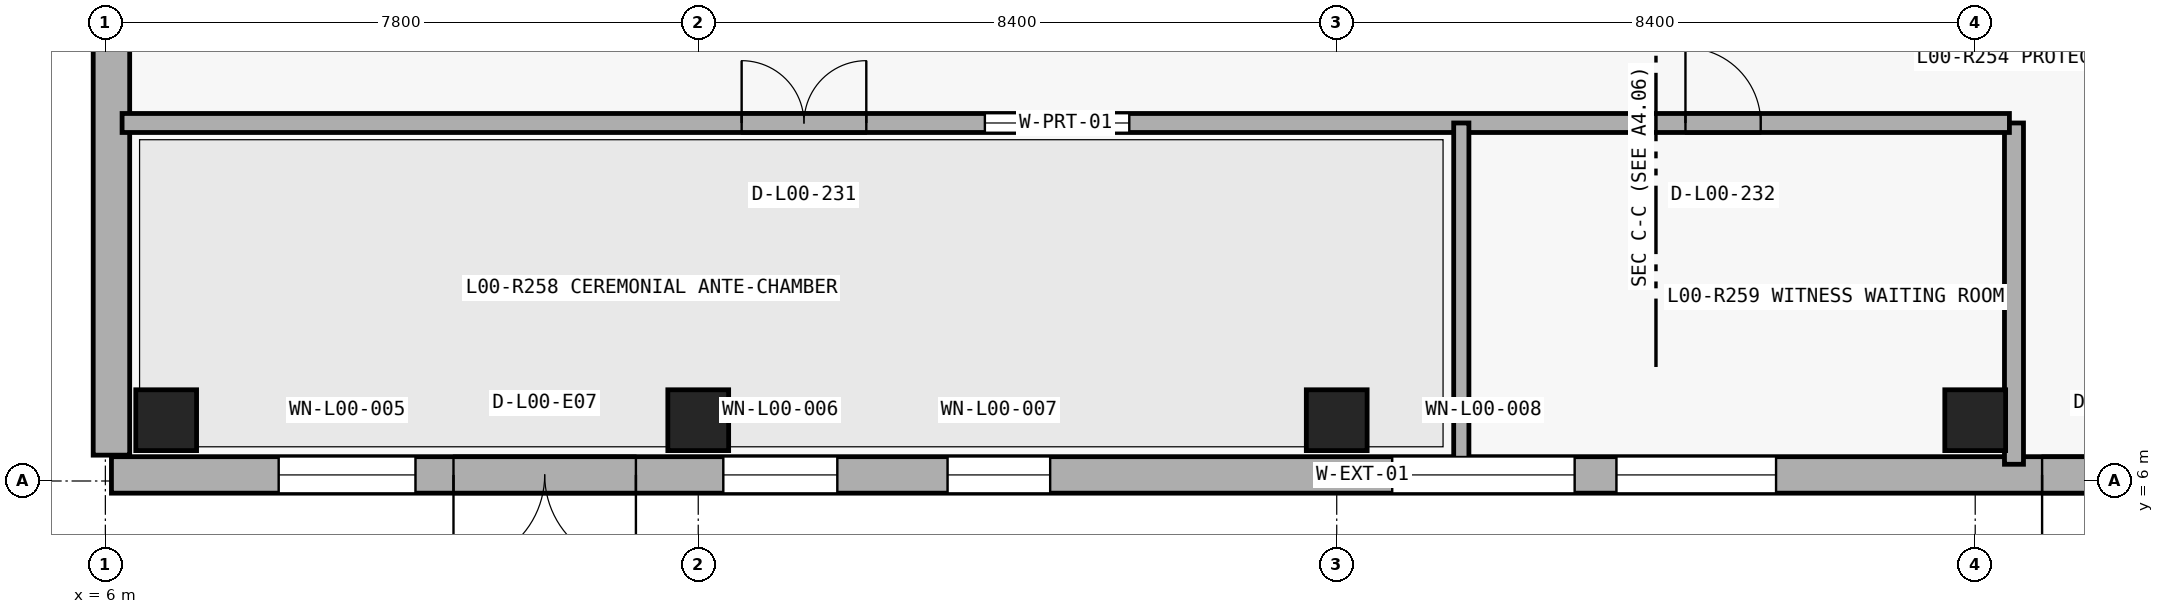
"""IFC4 building model, lengths in metres.
Left out: names, types, materials, properties, quantities, classifications, styles, units other than length and angle.
Written with IfcOpenShell. Run it as: python <this file> out.ifc"""

import sys

from ifc_helpers import new_model, si_unit, direction, frame, frame_2d, origin_with_axes, origin_2d_with_axis, place, context, subcontext, project, spatial, rectangle, circle, extrude, element, fill, save


model = new_model("IFC4")
c1 = context("Model", 3, precision=1e-05, world=origin_with_axes(), true_north=direction((0.0, 1.0)))
c2 = subcontext(c1, "Body", "Model", "MODEL_VIEW")
j1 = project(units=[si_unit("LENGTHUNIT", "METRE"), si_unit("PLANEANGLEUNIT", "RADIAN")], contexts=[c1])
p1 = place(None, origin_with_axes())
s1 = spatial("IfcSite", under=j1, at=p1, CompositionType="ELEMENT")
p2 = place(p1, origin_with_axes())
s2 = spatial("IfcBuilding", under=s1, at=p2, CompositionType="ELEMENT")
p3 = place(p2, origin_with_axes())
s3 = spatial("IfcBuildingStorey", under=s2, at=p3, CompositionType="ELEMENT", Elevation=0.0)
p4 = place(None, frame((6.08, 6.08, 0.0), z_axis=(0.0, 0.0, 1.0), x_axis=(1.0, 0.0, 0.0)))
e1 = element("IfcWall", 1, at=p4, inside=s3, PredefinedType="SOLIDWALL", context=c2, shape_type="SweptSolid", body=[
    extrude(rectangle(XDim=32.92, YDim=0.48, at=frame_2d((16.46, 0.0), x_axis=(1.0, 0.0))), origin_with_axes(), (0.0, 0.0, 1.0), 5.1),
])
p5 = place(None, frame((11.78, 6.08, 0.0), z_axis=(0.0, 0.0, 1.0), x_axis=(1.0, 0.0, 0.0)))
e2 = element("IfcOpeningElement", 2, at=p5, cuts=e1, PredefinedType="OPENING", context=c2, shape_type="SweptSolid", body=[
    extrude(rectangle(XDim=2.4, YDim=2.7, at=frame_2d((0.0, 1.35), x_axis=(1.0, 0.0))), frame((0.0, 0.25, 0.0), z_axis=(0.0, -1.0, 0.0), x_axis=(1.0, 0.0, 0.0)), (0.0, 0.0, 1.0), 0.5),
])
p6 = place(None, frame((32.58, 6.08, 0.0), z_axis=(0.0, 0.0, 1.0), x_axis=(1.0, 0.0, 0.0)))
e3 = element("IfcOpeningElement", 3, at=p6, cuts=e1, PredefinedType="OPENING", context=c2, shape_type="SweptSolid", body=[
    extrude(rectangle(XDim=2.2, YDim=2.6, at=frame_2d((0.0, 1.3), x_axis=(1.0, 0.0))), frame((0.0, 0.25, 0.0), z_axis=(0.0, -1.0, 0.0), x_axis=(1.0, 0.0, 0.0)), (0.0, 0.0, 1.0), 0.5),
])
p7 = place(None, frame((9.18, 6.08, 0.9), z_axis=(0.0, 0.0, 1.0), x_axis=(1.0, 0.0, 0.0)))
e4 = element("IfcOpeningElement", 4, at=p7, cuts=e1, PredefinedType="OPENING", context=c2, shape_type="SweptSolid", body=[
    extrude(rectangle(XDim=1.8, YDim=3.0, at=frame_2d((0.0, 1.5), x_axis=(1.0, 0.0))), frame((0.0, 0.25, 0.0), z_axis=(0.0, -1.0, 0.0), x_axis=(1.0, 0.0, 0.0)), (0.0, 0.0, 1.0), 0.5),
])
p8 = place(None, frame((14.88, 6.08, 0.9), z_axis=(0.0, 0.0, 1.0), x_axis=(1.0, 0.0, 0.0)))
e5 = element("IfcOpeningElement", 5, at=p8, cuts=e1, PredefinedType="OPENING", context=c2, shape_type="SweptSolid", body=[
    extrude(rectangle(XDim=1.5, YDim=2.7, at=frame_2d((0.0, 1.35), x_axis=(1.0, 0.0))), frame((0.0, 0.25, 0.0), z_axis=(0.0, -1.0, 0.0), x_axis=(1.0, 0.0, 0.0)), (0.0, 0.0, 1.0), 0.5),
])
p9 = place(None, frame((17.755, 6.08, 0.95), z_axis=(0.0, 0.0, 1.0), x_axis=(1.0, 0.0, 0.0)))
e6 = element("IfcOpeningElement", 6, at=p9, cuts=e1, PredefinedType="OPENING", context=c2, shape_type="SweptSolid", body=[
    extrude(rectangle(XDim=1.35, YDim=2.5, at=frame_2d((0.0, 1.25), x_axis=(1.0, 0.0))), frame((0.0, 0.25, 0.0), z_axis=(0.0, -1.0, 0.0), x_axis=(1.0, 0.0, 0.0)), (0.0, 0.0, 1.0), 0.5),
])
p10 = place(None, frame((24.13, 6.08, 2.7), z_axis=(0.0, 0.0, 1.0), x_axis=(1.0, 0.0, 0.0)))
e7 = element("IfcOpeningElement", 7, at=p10, cuts=e1, PredefinedType="OPENING", context=c2, shape_type="SweptSolid", body=[
    extrude(rectangle(XDim=2.4, YDim=1.4, at=frame_2d((0.0, 0.7), x_axis=(1.0, 0.0))), frame((0.0, 0.25, 0.0), z_axis=(0.0, -1.0, 0.0), x_axis=(1.0, 0.0, 0.0)), (0.0, 0.0, 1.0), 0.5),
])
p11 = place(None, frame((26.93, 6.08, 2.7), z_axis=(0.0, 0.0, 1.0), x_axis=(1.0, 0.0, 0.0)))
e8 = element("IfcOpeningElement", 8, at=p11, cuts=e1, PredefinedType="OPENING", context=c2, shape_type="SweptSolid", body=[
    extrude(rectangle(XDim=2.1, YDim=1.3, at=frame_2d((0.0, 0.65), x_axis=(1.0, 0.0))), frame((0.0, 0.25, 0.0), z_axis=(0.0, -1.0, 0.0), x_axis=(1.0, 0.0, 0.0)), (0.0, 0.0, 1.0), 0.5),
])
p12 = place(None, frame((6.08, 30.34, 0.0), z_axis=(0.0, 0.0, 1.0), x_axis=(0.0, -1.0, 0.0)))
e9 = element("IfcWall", 9, at=p12, inside=s3, PredefinedType="SOLIDWALL", context=c2, shape_type="SweptSolid", body=[
    extrude(rectangle(XDim=24.0, YDim=0.48, at=frame_2d((12.0, 0.0), x_axis=(1.0, 0.0))), origin_with_axes(), (0.0, 0.0, 1.0), 5.1),
])
p13 = place(None, frame((6.08, 17.84, 0.0), z_axis=(0.0, 0.0, 1.0), x_axis=(0.0, -1.0, 0.0)))
e10 = element("IfcOpeningElement", 10, at=p13, cuts=e9, PredefinedType="OPENING", context=c2, shape_type="SweptSolid", body=[
    extrude(rectangle(XDim=2.0, YDim=2.5, at=frame_2d((0.0, 1.25), x_axis=(1.0, 0.0))), frame((0.0, 0.25, 0.0), z_axis=(0.0, -1.0, 0.0), x_axis=(1.0, 0.0, 0.0)), (0.0, 0.0, 1.0), 0.5),
])
p14 = place(None, frame((6.08, 27.24, 2.75), z_axis=(0.0, 0.0, 1.0), x_axis=(0.0, -1.0, 0.0)))
e11 = element("IfcOpeningElement", 11, at=p14, cuts=e9, PredefinedType="OPENING", context=c2, shape_type="SweptSolid", body=[
    extrude(rectangle(XDim=1.8, YDim=1.2, at=frame_2d((0.0, 0.6), x_axis=(1.0, 0.0))), frame((0.0, 0.25, 0.0), z_axis=(0.0, -1.0, 0.0), x_axis=(1.0, 0.0, 0.0)), (0.0, 0.0, 1.0), 0.5),
])
p15 = place(None, frame((6.08, 23.49, 0.9), z_axis=(0.0, 0.0, 1.0), x_axis=(0.0, -1.0, 0.0)))
e12 = element("IfcOpeningElement", 12, at=p15, cuts=e9, PredefinedType="OPENING", context=c2, shape_type="SweptSolid", body=[
    extrude(rectangle(XDim=1.4, YDim=2.2, at=frame_2d((0.0, 1.1), x_axis=(1.0, 0.0))), frame((0.0, 0.25, 0.0), z_axis=(0.0, -1.0, 0.0), x_axis=(1.0, 0.0, 0.0)), (0.0, 0.0, 1.0), 0.5),
])
p16 = place(None, frame((6.08, 20.165, 0.9), z_axis=(0.0, 0.0, 1.0), x_axis=(0.0, -1.0, 0.0)))
e13 = element("IfcOpeningElement", 13, at=p16, cuts=e9, PredefinedType="OPENING", context=c2, shape_type="SweptSolid", body=[
    extrude(rectangle(XDim=1.25, YDim=2.1, at=frame_2d((0.0, 1.05), x_axis=(1.0, 0.0))), frame((0.0, 0.25, 0.0), z_axis=(0.0, -1.0, 0.0), x_axis=(1.0, 0.0, 0.0)), (0.0, 0.0, 1.0), 0.5),
])
p17 = place(None, frame((6.08, 14.84, 0.95), z_axis=(0.0, 0.0, 1.0), x_axis=(0.0, -1.0, 0.0)))
e14 = element("IfcOpeningElement", 14, at=p17, cuts=e9, PredefinedType="OPENING", context=c2, shape_type="SweptSolid", body=[
    extrude(rectangle(XDim=1.1, YDim=2.0, at=frame_2d((0.0, 1.0), x_axis=(1.0, 0.0))), frame((0.0, 0.25, 0.0), z_axis=(0.0, -1.0, 0.0), x_axis=(1.0, 0.0, 0.0)), (0.0, 0.0, 1.0), 0.5),
])
p18 = place(None, frame((31.11, 6.22, 0.0), z_axis=(0.0, 0.0, 1.0), x_axis=(0.0, 1.0, 0.0)))
e15 = element("IfcWall", 15, at=p18, inside=s3, PredefinedType="PARTITIONING", context=c2, shape_type="SweptSolid", body=[
    extrude(rectangle(XDim=4.49, YDim=0.25, at=frame_2d((2.245, 0.0), x_axis=(1.0, 0.0))), origin_with_axes(), (0.0, 0.0, 1.0), 5.08),
])
p19 = place(None, frame((6.22, 10.71, 0.0), z_axis=(0.0, 0.0, 1.0), x_axis=(1.0, 0.0, 0.0)))
e16 = element("IfcWall", 16, at=p19, inside=s3, PredefinedType="PARTITIONING", context=c2, shape_type="SweptSolid", body=[
    extrude(rectangle(XDim=24.83, YDim=0.25, at=frame_2d((12.415, 0.0), x_axis=(1.0, 0.0))), origin_with_axes(), (0.0, 0.0, 1.0), 5.08),
])
p20 = place(None, frame((15.191, 10.71, 0.0), z_axis=(0.0, 0.0, 1.0), x_axis=(1.0, 0.0, 0.0)))
e17 = element("IfcOpeningElement", 17, at=p20, cuts=e16, PredefinedType="OPENING", context=c2, shape_type="SweptSolid", body=[
    extrude(rectangle(XDim=1.64, YDim=2.42, at=frame_2d((0.0, 1.21), x_axis=(1.0, 0.0))), frame((0.0, 0.135, 0.0), z_axis=(0.0, -1.0, 0.0), x_axis=(1.0, 0.0, 0.0)), (0.0, 0.0, 1.0), 0.27),
])
p21 = place(None, frame((27.283, 10.71, 0.0), z_axis=(0.0, 0.0, 1.0), x_axis=(1.0, 0.0, 0.0)))
e18 = element("IfcOpeningElement", 18, at=p21, cuts=e16, PredefinedType="OPENING", context=c2, shape_type="SweptSolid", body=[
    extrude(rectangle(XDim=0.99, YDim=2.22, at=frame_2d((0.0, 1.11), x_axis=(1.0, 0.0))), frame((0.0, 0.135, 0.0), z_axis=(0.0, -1.0, 0.0), x_axis=(1.0, 0.0, 0.0)), (0.0, 0.0, 1.0), 0.27),
])
p22 = place(None, frame((18.521, 10.71, 1.05), z_axis=(0.0, 0.0, 1.0), x_axis=(1.0, 0.0, 0.0)))
e19 = element("IfcOpeningElement", 19, at=p22, cuts=e16, PredefinedType="OPENING", context=c2, shape_type="SweptSolid", body=[
    extrude(rectangle(XDim=1.9, YDim=1.5, at=frame_2d((0.0, 0.75), x_axis=(1.0, 0.0))), frame((0.0, 0.135, 0.0), z_axis=(0.0, -1.0, 0.0), x_axis=(1.0, 0.0, 0.0)), (0.0, 0.0, 1.0), 0.27),
])
p23 = place(None, frame((23.839, 6.22, 0.0), z_axis=(0.0, 0.0, 1.0), x_axis=(0.0, 1.0, 0.0)))
e20 = element("IfcWall", 20, at=p23, inside=s3, PredefinedType="PARTITIONING", context=c2, shape_type="SweptSolid", body=[
    extrude(rectangle(XDim=4.49, YDim=0.2, at=frame_2d((2.245, 0.0), x_axis=(1.0, 0.0))), origin_with_axes(), (0.0, 0.0, 1.0), 5.08),
])
for number, where, z_axis, x_axis in (
    (21, (6.8, 6.8, 0.0), (0.0, 0.0, 1.0), (1.0, 0.0, 0.0)),
    (22, (13.8, 6.8, 0.0), (0.0, 0.0, 1.0), (1.0, 0.0, 0.0)),
    (23, (22.2, 6.8, 0.0), (0.0, 0.0, 1.0), (1.0, 0.0, 0.0)),
    (24, (30.6, 6.8, 0.0), (0.0, 0.0, 1.0), (1.0, 0.0, 0.0)),
):
    element("IfcColumn", number, at=place(None, frame(where, z_axis=z_axis, x_axis=x_axis)), inside=s3, PredefinedType="COLUMN", context=c2, shape_type="SweptSolid", body=[
        extrude(circle(Radius=0.4, at=origin_2d_with_axis()), origin_with_axes(), (0.0, 0.0, 1.0), 5.4),
    ])
p24 = place(None, frame((11.78, 6.08, 0.0), z_axis=(0.0, 0.0, 1.0), x_axis=(-1.0, 0.0, 0.0)))
e25 = element("IfcDoor", 25, at=p24, inside=s3, OperationType="DOUBLE_DOOR_SINGLE_SWING", PredefinedType="DOOR", context=c2, shape_type="SweptSolid", body=[
    extrude(rectangle(XDim=2.4, YDim=2.7, at=frame_2d((0.0, 1.35), x_axis=(1.0, 0.0))), frame((0.0, 0.04, 0.0), z_axis=(0.0, -1.0, 0.0), x_axis=(1.0, 0.0, 0.0)), (0.0, 0.0, 1.0), 0.08),
])
fill(e2, e25)
p25 = place(None, frame((32.58, 6.08, 0.0), z_axis=(0.0, 0.0, 1.0), x_axis=(-1.0, 0.0, 0.0)))
e26 = element("IfcDoor", 26, at=p25, inside=s3, OperationType="DOUBLE_DOOR_SINGLE_SWING", PredefinedType="DOOR", context=c2, shape_type="SweptSolid", body=[
    extrude(rectangle(XDim=2.2, YDim=2.6, at=frame_2d((0.0, 1.3), x_axis=(1.0, 0.0))), frame((0.0, 0.04, 0.0), z_axis=(0.0, -1.0, 0.0), x_axis=(1.0, 0.0, 0.0)), (0.0, 0.0, 1.0), 0.08),
])
fill(e3, e26)
p26 = place(None, frame((15.191, 10.71, 0.0), z_axis=(0.0, 0.0, 1.0), x_axis=(1.0, 0.0, 0.0)))
e27 = element("IfcDoor", 27, at=p26, inside=s3, OperationType="DOUBLE_DOOR_SINGLE_SWING", PredefinedType="DOOR", context=c2, shape_type="SweptSolid", body=[
    extrude(rectangle(XDim=1.64, YDim=2.42, at=frame_2d((0.0, 1.21), x_axis=(1.0, 0.0))), frame((0.0, 0.04, 0.0), z_axis=(0.0, -1.0, 0.0), x_axis=(1.0, 0.0, 0.0)), (0.0, 0.0, 1.0), 0.08),
])
fill(e17, e27)
p27 = place(None, frame((27.283, 10.71, 0.0), z_axis=(0.0, 0.0, 1.0), x_axis=(1.0, 0.0, 0.0)))
e28 = element("IfcDoor", 28, at=p27, inside=s3, OperationType="SINGLE_SWING_LEFT", PredefinedType="DOOR", context=c2, shape_type="SweptSolid", body=[
    extrude(rectangle(XDim=0.99, YDim=2.22, at=frame_2d((0.0, 1.11), x_axis=(1.0, 0.0))), frame((0.0, 0.04, 0.0), z_axis=(0.0, -1.0, 0.0), x_axis=(1.0, 0.0, 0.0)), (0.0, 0.0, 1.0), 0.08),
])
fill(e18, e28)
p28 = place(None, frame((9.18, 6.08, 0.9), z_axis=(0.0, 0.0, 1.0), x_axis=(1.0, 0.0, 0.0)))
e29 = element("IfcWindow", 29, at=p28, inside=s3, PartitioningType="SINGLE_PANEL", PredefinedType="WINDOW", context=c2, shape_type="SweptSolid", body=[
    extrude(rectangle(XDim=1.8, YDim=3.0, at=frame_2d((0.0, 1.5), x_axis=(1.0, 0.0))), frame((0.0, 0.03, 0.0), z_axis=(0.0, -1.0, 0.0), x_axis=(1.0, 0.0, 0.0)), (0.0, 0.0, 1.0), 0.06),
])
fill(e4, e29)
p29 = place(None, frame((14.88, 6.08, 0.9), z_axis=(0.0, 0.0, 1.0), x_axis=(1.0, 0.0, 0.0)))
e30 = element("IfcWindow", 30, at=p29, inside=s3, PartitioningType="SINGLE_PANEL", PredefinedType="WINDOW", context=c2, shape_type="SweptSolid", body=[
    extrude(rectangle(XDim=1.5, YDim=2.7, at=frame_2d((0.0, 1.35), x_axis=(1.0, 0.0))), frame((0.0, 0.03, 0.0), z_axis=(0.0, -1.0, 0.0), x_axis=(1.0, 0.0, 0.0)), (0.0, 0.0, 1.0), 0.06),
])
fill(e5, e30)
p30 = place(None, frame((17.755, 6.08, 0.95), z_axis=(0.0, 0.0, 1.0), x_axis=(1.0, 0.0, 0.0)))
e31 = element("IfcWindow", 31, at=p30, inside=s3, PartitioningType="SINGLE_PANEL", PredefinedType="WINDOW", context=c2, shape_type="SweptSolid", body=[
    extrude(rectangle(XDim=1.35, YDim=2.5, at=frame_2d((0.0, 1.25), x_axis=(1.0, 0.0))), frame((0.0, 0.03, 0.0), z_axis=(0.0, -1.0, 0.0), x_axis=(1.0, 0.0, 0.0)), (0.0, 0.0, 1.0), 0.06),
])
fill(e6, e31)
p31 = place(None, frame((24.13, 6.08, 2.7), z_axis=(0.0, 0.0, 1.0), x_axis=(1.0, 0.0, 0.0)))
e32 = element("IfcWindow", 32, at=p31, inside=s3, PartitioningType="SINGLE_PANEL", PredefinedType="WINDOW", context=c2, shape_type="SweptSolid", body=[
    extrude(rectangle(XDim=2.4, YDim=1.4, at=frame_2d((0.0, 0.7), x_axis=(1.0, 0.0))), frame((0.0, 0.03, 0.0), z_axis=(0.0, -1.0, 0.0), x_axis=(1.0, 0.0, 0.0)), (0.0, 0.0, 1.0), 0.06),
])
fill(e7, e32)
p32 = place(None, frame((26.93, 6.08, 2.7), z_axis=(0.0, 0.0, 1.0), x_axis=(1.0, 0.0, 0.0)))
e33 = element("IfcWindow", 33, at=p32, inside=s3, PartitioningType="SINGLE_PANEL", PredefinedType="WINDOW", context=c2, shape_type="SweptSolid", body=[
    extrude(rectangle(XDim=2.1, YDim=1.3, at=frame_2d((0.0, 0.65), x_axis=(1.0, 0.0))), frame((0.0, 0.03, 0.0), z_axis=(0.0, -1.0, 0.0), x_axis=(1.0, 0.0, 0.0)), (0.0, 0.0, 1.0), 0.06),
])
fill(e8, e33)
p33 = place(None, frame((18.521, 10.71, 1.05), z_axis=(0.0, 0.0, 1.0), x_axis=(1.0, 0.0, 0.0)))
e34 = element("IfcWindow", 34, at=p33, inside=s3, PartitioningType="SINGLE_PANEL", PredefinedType="WINDOW", context=c2, shape_type="SweptSolid", body=[
    extrude(rectangle(XDim=1.9, YDim=1.5, at=frame_2d((0.0, 0.75), x_axis=(1.0, 0.0))), frame((0.0, 0.03, 0.0), z_axis=(0.0, -1.0, 0.0), x_axis=(1.0, 0.0, 0.0)), (0.0, 0.0, 1.0), 0.06),
])
fill(e19, e34)
save(model, sys.argv[1])
